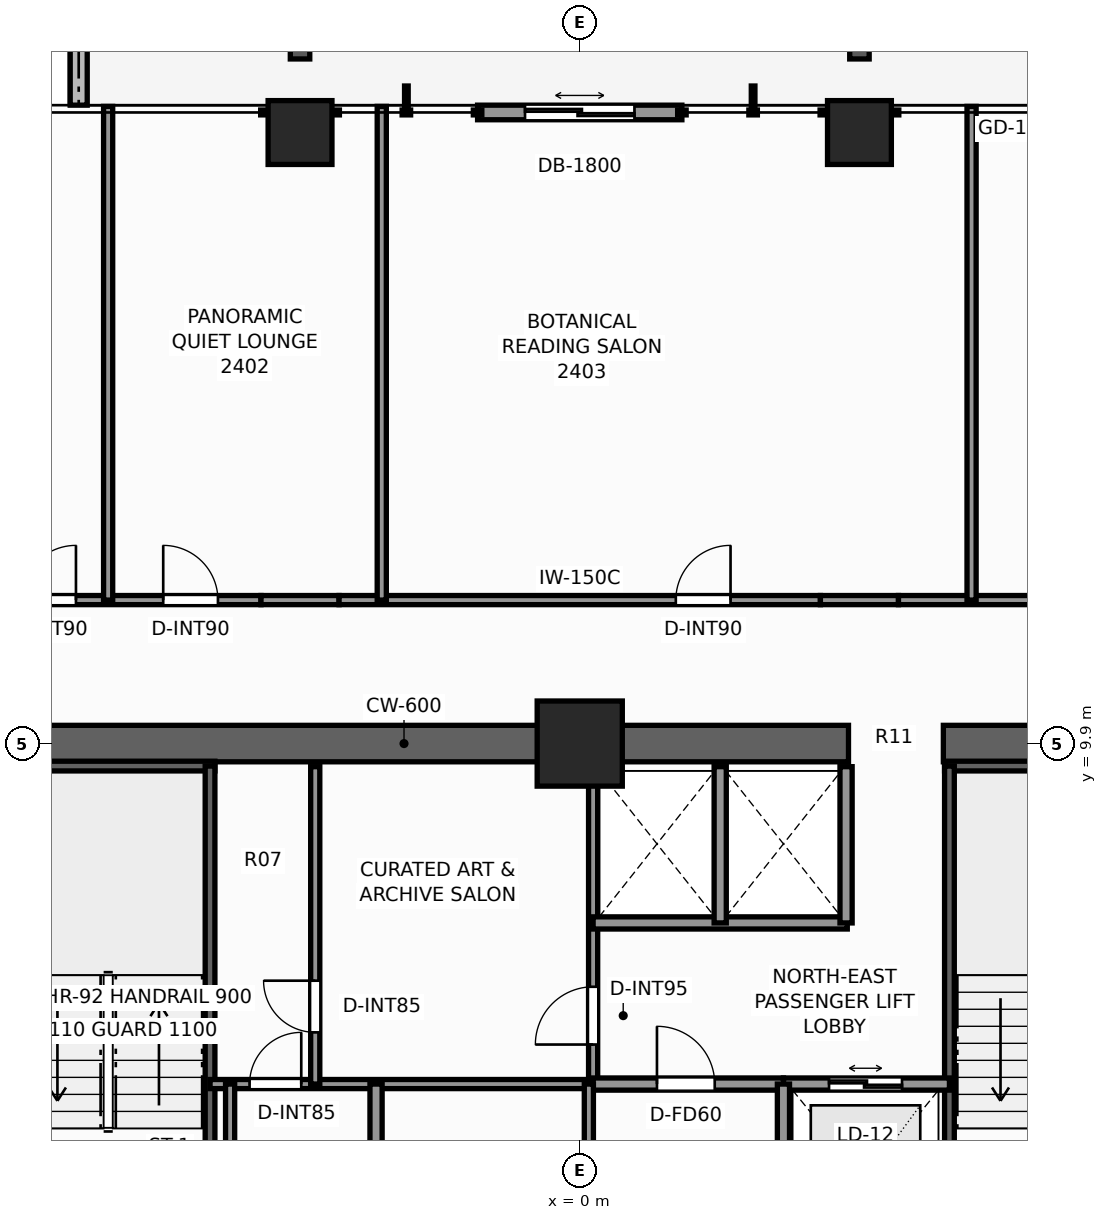
"""IFC4 building model, lengths in metres.
Left out: names, types, materials, properties, quantities, classifications, styles, units other than length and angle.
Written with IfcOpenShell. Run it as: python <this file> out.ifc"""

import sys

from ifc_helpers import new_model, si_unit, direction, frame, frame_2d, origin, origin_2d, place, context, subcontext, project, spatial, rectangle, extrude, element, fill, save


model = new_model("IFC4")
c1 = context("Model", 3, precision=1e-05, world=origin(), true_north=direction((0.0, 1.0)))
c2 = subcontext(c1, "Body", "Model", "MODEL_VIEW")
j1 = project(units=[si_unit("LENGTHUNIT", "METRE"), si_unit("PLANEANGLEUNIT", "RADIAN")], contexts=[c1])
p1 = place(None, origin())
s1 = spatial("IfcSite", under=j1, at=p1, CompositionType="ELEMENT")
p2 = place(p1, origin())
s2 = spatial("IfcBuilding", under=s1, at=p2, CompositionType="ELEMENT")
p3 = place(p2, frame((0.0, 0.0, 85.4)))
s3 = spatial("IfcBuildingStorey", under=s2, at=p3, CompositionType="ELEMENT", Elevation=85.4)
p4 = place(p3, frame((-10.2, 9.9, 0.0), z_axis=(0.0, 0.0, 1.0), x_axis=(1.0, 0.0, 0.0)))
e1 = element("IfcWall", 1, at=p4, inside=s3, PredefinedType="SHEAR", context=c2, shape_type="SweptSolid", body=[
    extrude(rectangle(XDim=14.62, YDim=0.6, at=frame_2d((7.31, 0.0))), origin(), (0.0, 0.0, 1.0), 3.3),
])
p5 = place(p3, frame((5.98, 9.9, 0.0), z_axis=(0.0, 0.0, 1.0), x_axis=(1.0, 0.0, 0.0)))
e2 = element("IfcWall", 2, at=p5, inside=s3, PredefinedType="SHEAR", context=c2, shape_type="SweptSolid", body=[
    extrude(rectangle(XDim=4.22, YDim=0.6, at=frame_2d((2.11, 0.0))), origin(), (0.0, 0.0, 1.0), 3.3),
])
p6 = place(p3, frame((0.0, 9.9, 0.0), z_axis=(0.0, 0.0, 1.0), x_axis=(1.0, 0.0, 0.0)))
e3 = element("IfcColumn", 3, at=p6, inside=s3, PredefinedType="COLUMN", context=c2, shape_type="SweptSolid", body=[
    extrude(rectangle(XDim=1.4, YDim=1.4, at=origin_2d()), origin(), (0.0, 0.0, 1.0), 3.3),
])
for number, where, z_axis, x_axis in (
    (4, (-4.6, 19.95, 0.0), (0.0, 0.0, 1.0), (1.0, 0.0, 0.0)),
    (5, (4.6, 19.95, 0.0), (0.0, 0.0, 1.0), (1.0, 0.0, 0.0)),
):
    element("IfcColumn", number, at=place(p3, frame(where, z_axis=z_axis, x_axis=x_axis)), inside=s3, PredefinedType="COLUMN", context=c2, shape_type="SweptSolid", body=[
        extrude(rectangle(XDim=1.05, YDim=1.05, at=origin_2d()), origin(), (0.0, 0.0, 1.0), 3.3),
    ])
p7 = place(p3, frame((-8.24, 21.713, -0.04), z_axis=(0.0, 0.0, 1.0), x_axis=(0.0, -1.0, 0.0)))
e6 = element("IfcWall", 6, at=p7, inside=s3, PredefinedType="PARAPET", context=c2, shape_type="SweptSolid", body=[
    extrude(rectangle(XDim=1.313, YDim=0.28, at=frame_2d((0.656, 0.0))), origin(), (0.0, 0.0, 1.0), 0.42),
])
p8 = place(p3, frame((-1.68, 20.28, 0.0), z_axis=(0.0, 0.0, 1.0), x_axis=(1.0, 0.0, 0.0)))
e7 = element("IfcWall", 7, at=p8, inside=s3, PredefinedType="STANDARD", context=c2, shape_type="SweptSolid", body=[
    extrude(rectangle(XDim=3.36, YDim=0.24, at=frame_2d((1.68, 0.0))), origin(), (0.0, 0.0, 1.0), 3.08),
])
p9 = place(p8, frame((0.78, 0.0, 0.0)))
e8 = element("IfcOpeningElement", 8, at=p9, cuts=e7, PredefinedType="OPENING", context=c2, shape_type="SweptSolid", body=[
    extrude(rectangle(XDim=1.8, YDim=2.2, at=frame_2d((0.9, 1.1))), frame((0.0, 0.13, 0.0), z_axis=(0.0, -1.0, 0.0), x_axis=(1.0, 0.0, 0.0)), (0.0, 0.0, 1.0), 0.26),
])
p10 = place(p3, frame((-9.52, 9.53, 0.0), z_axis=(0.0, 0.0, 1.0), x_axis=(1.0, 0.0, 0.0)))
e9 = element("IfcWall", 9, at=p10, inside=s3, PredefinedType="SHEAR", context=c2, shape_type="SweptSolid", body=[
    extrude(rectangle(XDim=3.52, YDim=0.16, at=frame_2d((1.76, 0.0))), origin(), (0.0, 0.0, 1.0), 3.3),
])
p11 = place(p3, frame((-6.08, 1.97, 0.0), z_axis=(0.0, 0.0, 1.0), x_axis=(0.0, 1.0, 0.0)))
e10 = element("IfcWall", 10, at=p11, inside=s3, PredefinedType="SHEAR", context=c2, shape_type="SweptSolid", body=[
    extrude(rectangle(XDim=7.56, YDim=0.16, at=frame_2d((3.78, 0.0))), origin(), (0.0, 0.0, 1.0), 3.3),
])
p12 = place(p3, frame((6.0, 9.53, 0.0), z_axis=(0.0, 0.0, 1.0), x_axis=(1.0, 0.0, 0.0)))
e11 = element("IfcWall", 11, at=p12, inside=s3, PredefinedType="SHEAR", context=c2, shape_type="SweptSolid", body=[
    extrude(rectangle(XDim=3.52, YDim=0.16, at=frame_2d((1.76, 0.0))), origin(), (0.0, 0.0, 1.0), 3.3),
])
p13 = place(p3, frame((6.08, 1.97, 0.0), z_axis=(0.0, 0.0, 1.0), x_axis=(0.0, 1.0, 0.0)))
e12 = element("IfcWall", 12, at=p13, inside=s3, PredefinedType="SHEAR", context=c2, shape_type="SweptSolid", body=[
    extrude(rectangle(XDim=7.56, YDim=0.16, at=frame_2d((3.78, 0.0))), origin(), (0.0, 0.0, 1.0), 3.3),
])
p14 = place(p3, frame((3.35, 4.3, 0.0), z_axis=(0.0, 0.0, 1.0), x_axis=(1.0, 0.0, 0.0)))
e13 = element("IfcWall", 13, at=p14, inside=s3, PredefinedType="SOLIDWALL", context=c2, shape_type="SweptSolid", body=[
    extrude(rectangle(XDim=2.73, YDim=0.2, at=frame_2d((1.365, 0.0))), origin(), (0.0, 0.0, 1.0), 3.08),
])
p15 = place(p14, frame((0.75, 0.0, 0.0)))
e14 = element("IfcOpeningElement", 14, at=p15, cuts=e13, PredefinedType="OPENING", context=c2, shape_type="SweptSolid", body=[
    extrude(rectangle(XDim=1.2, YDim=2.25, at=frame_2d((0.6, 1.125))), frame((0.0, 0.11, 0.0), z_axis=(0.0, -1.0, 0.0), x_axis=(1.0, 0.0, 0.0)), (0.0, 0.0, 1.0), 0.22),
])
p16 = place(p3, frame((-6.08, 4.3, 0.0), z_axis=(0.0, 0.0, 1.0), x_axis=(1.0, 0.0, 0.0)))
e15 = element("IfcWall", 15, at=p16, inside=s3, PredefinedType="PARTITIONING", context=c2, shape_type="SweptSolid", body=[
    extrude(rectangle(XDim=6.3, YDim=0.15, at=frame_2d((3.15, 0.0))), origin(), (0.0, 0.0, 1.0), 3.08),
])
p17 = place(p16, frame((0.65, 0.0, 0.0)))
e16 = element("IfcOpeningElement", 16, at=p17, cuts=e15, PredefinedType="OPENING", context=c2, shape_type="SweptSolid", body=[
    extrude(rectangle(XDim=0.85, YDim=2.03, at=frame_2d((0.425, 1.015))), frame((0.0, 0.085, 0.0), z_axis=(0.0, -1.0, 0.0), x_axis=(1.0, 0.0, 0.0)), (0.0, 0.0, 1.0), 0.17),
])
p18 = place(p3, frame((0.22, 4.3, 0.0), z_axis=(0.0, 0.0, 1.0), x_axis=(0.0, 1.0, 0.0)))
e17 = element("IfcWall", 17, at=p18, inside=s3, PredefinedType="PARTITIONING", context=c2, shape_type="SweptSolid", body=[
    extrude(rectangle(XDim=5.22, YDim=0.15, at=frame_2d((2.61, 0.0))), origin(), (0.0, 0.0, 1.0), 3.08),
])
p19 = place(p18, frame((0.65, 0.0, 0.0)))
e18 = element("IfcOpeningElement", 18, at=p19, cuts=e17, PredefinedType="OPENING", context=c2, shape_type="SweptSolid", body=[
    extrude(rectangle(XDim=0.95, YDim=2.06, at=frame_2d((0.475, 1.03))), frame((0.0, 0.085, 0.0), z_axis=(0.0, -1.0, 0.0), x_axis=(1.0, 0.0, 0.0)), (0.0, 0.0, 1.0), 0.17),
])
p20 = place(p3, frame((-4.35, 4.3, 0.0), z_axis=(0.0, 0.0, 1.0), x_axis=(0.0, 1.0, 0.0)))
e19 = element("IfcWall", 19, at=p20, inside=s3, PredefinedType="PARTITIONING", context=c2, shape_type="SweptSolid", body=[
    extrude(rectangle(XDim=5.22, YDim=0.15, at=frame_2d((2.61, 0.0))), origin(), (0.0, 0.0, 1.0), 3.08),
])
p21 = place(p20, frame((0.85, 0.0, 0.0)))
e20 = element("IfcOpeningElement", 20, at=p21, cuts=e19, PredefinedType="OPENING", context=c2, shape_type="SweptSolid", body=[
    extrude(rectangle(XDim=0.85, YDim=2.03, at=frame_2d((0.425, 1.015))), frame((0.0, 0.085, 0.0), z_axis=(0.0, -1.0, 0.0), x_axis=(1.0, 0.0, 0.0)), (0.0, 0.0, 1.0), 0.17),
])
p22 = place(p3, frame((0.22, 6.95, 0.0), z_axis=(0.0, 0.0, 1.0), x_axis=(1.0, 0.0, 0.0)))
e21 = element("IfcWall", 21, at=p22, inside=s3, PredefinedType="SOLIDWALL", context=c2, shape_type="SweptSolid", body=[
    extrude(rectangle(XDim=4.18, YDim=0.2, at=frame_2d((2.09, 0.0))), origin(), (0.0, 0.0, 1.0), 3.08),
])
for number, where, z_axis, x_axis in (
    (22, (4.38, 6.95, 0.0), (0.0, 0.0, 1.0), (0.0, 1.0, 0.0)),
    (23, (2.31, 6.95, 0.0), (0.0, 0.0, 1.0), (0.0, 1.0, 0.0)),
):
    element("IfcWall", number, at=place(p3, frame(where, z_axis=z_axis, x_axis=x_axis)), inside=s3, PredefinedType="SOLIDWALL", context=c2, shape_type="SweptSolid", body=[
        extrude(rectangle(XDim=2.57, YDim=0.2, at=frame_2d((1.285, 0.0))), origin(), (0.0, 0.0, 1.0), 3.08),
    ])
p23 = place(p3, frame((0.22, 4.3, 0.0), z_axis=(0.0, 0.0, 1.0), x_axis=(1.0, 0.0, 0.0)))
e24 = element("IfcWall", 24, at=p23, inside=s3, PredefinedType="SOLIDWALL", context=c2, shape_type="SweptSolid", body=[
    extrude(rectangle(XDim=3.13, YDim=0.2, at=frame_2d((1.565, 0.0))), origin(), (0.0, 0.0, 1.0), 3.08),
])
p24 = place(p23, frame((1.05, 0.0, 0.0)))
e25 = element("IfcOpeningElement", 25, at=p24, cuts=e24, PredefinedType="OPENING", context=c2, shape_type="SweptSolid", body=[
    extrude(rectangle(XDim=0.95, YDim=2.06, at=frame_2d((0.475, 1.03))), frame((0.0, 0.11, 0.0), z_axis=(0.0, -1.0, 0.0), x_axis=(1.0, 0.0, 0.0)), (0.0, 0.0, 1.0), 0.22),
])
for number, where, z_axis, x_axis in (
    (26, (-3.35, 1.1, 0.0), (0.0, 0.0, 1.0), (0.0, 1.0, 0.0)),
    (27, (3.35, 1.1, 0.0), (0.0, 0.0, 1.0), (0.0, 1.0, 0.0)),
):
    element("IfcWall", number, at=place(p3, frame(where, z_axis=z_axis, x_axis=x_axis)), inside=s3, PredefinedType="SOLIDWALL", context=c2, shape_type="SweptSolid", body=[
        extrude(rectangle(XDim=3.2, YDim=0.2, at=frame_2d((1.6, 0.0))), origin(), (0.0, 0.0, 1.0), 3.08),
    ])
p25 = place(p3, frame((0.15, -1.7, 0.0), z_axis=(0.0, 0.0, 1.0), x_axis=(0.0, 1.0, 0.0)))
e28 = element("IfcWall", 28, at=p25, inside=s3, PredefinedType="PARTITIONING", context=c2, shape_type="SweptSolid", body=[
    extrude(rectangle(XDim=6.0, YDim=0.15, at=frame_2d((3.0, 0.0))), origin(), (0.0, 0.0, 1.0), 3.08),
])
p26 = place(p25, frame((3.6, 0.0, 0.0)))
e29 = element("IfcOpeningElement", 29, at=p26, cuts=e28, PredefinedType="OPENING", context=c2, shape_type="SweptSolid", body=[
    extrude(rectangle(XDim=0.85, YDim=2.03, at=frame_2d((0.425, 1.015))), frame((0.0, 0.085, 0.0), z_axis=(0.0, -1.0, 0.0), x_axis=(1.0, 0.0, 0.0)), (0.0, 0.0, 1.0), 0.17),
])
p27 = place(p3, frame((-5.75, 1.97, 0.0), z_axis=(0.0, 0.0, 1.0), x_axis=(0.0, 1.0, 0.0)))
e30 = element("IfcWall", 30, at=p27, inside=s3, PredefinedType="PARTITIONING", context=c2, shape_type="SweptSolid", body=[
    extrude(rectangle(XDim=2.33, YDim=0.15, at=frame_2d((1.165, 0.0))), origin(), (0.0, 0.0, 1.0), 3.08),
])
p28 = place(p3, frame((-10.013, 12.26, 0.0), z_axis=(0.0, 0.0, 1.0), x_axis=(1.0, 0.0, 0.0)))
e31 = element("IfcWall", 31, at=p28, inside=s3, PredefinedType="PARTITIONING", context=c2, shape_type="SweptSolid", body=[
    extrude(rectangle(XDim=4.771, YDim=0.15, at=frame_2d((2.386, 0.0))), origin(), (0.0, 0.0, 1.0), 3.08),
])
p29 = place(p28, frame((0.828, 0.0, 0.0)))
e32 = element("IfcOpeningElement", 32, at=p29, cuts=e31, PredefinedType="OPENING", context=c2, shape_type="SweptSolid", body=[
    extrude(rectangle(XDim=0.9, YDim=2.06, at=frame_2d((0.45, 1.03))), frame((0.0, 0.085, 0.0), z_axis=(0.0, -1.0, 0.0), x_axis=(1.0, 0.0, 0.0)), (0.0, 0.0, 1.0), 0.17),
])
p30 = place(p28, frame((3.163, 0.0, 0.0)))
e33 = element("IfcOpeningElement", 33, at=p30, cuts=e31, PredefinedType="OPENING", context=c2, shape_type="SweptSolid", body=[
    extrude(rectangle(XDim=0.9, YDim=2.06, at=frame_2d((0.45, 1.03))), frame((0.0, 0.085, 0.0), z_axis=(0.0, -1.0, 0.0), x_axis=(1.0, 0.0, 0.0)), (0.0, 0.0, 1.0), 0.17),
])
p31 = place(p3, frame((-5.242, 12.26, 0.0), z_axis=(0.0, 0.0, 1.0), x_axis=(1.0, 0.0, 0.0)))
e34 = element("IfcWall", 34, at=p31, inside=s3, PredefinedType="PARTITIONING", context=c2, shape_type="SweptSolid", body=[
    extrude(rectangle(XDim=1.284, YDim=0.15, at=frame_2d((0.642, 0.0))), origin(), (0.0, 0.0, 1.0), 1.265),
])
p32 = place(p3, frame((-3.958, 12.26, 0.0), z_axis=(0.0, 0.0, 1.0), x_axis=(1.0, 0.0, 0.0)))
e35 = element("IfcWall", 35, at=p32, inside=s3, PredefinedType="PARTITIONING", context=c2, shape_type="SweptSolid", body=[
    extrude(rectangle(XDim=7.916, YDim=0.15, at=frame_2d((3.958, 0.0))), origin(), (0.0, 0.0, 1.0), 2.605),
])
p33 = place(p32, frame((5.538, 0.0, 0.0)))
e36 = element("IfcOpeningElement", 36, at=p33, cuts=e35, PredefinedType="OPENING", context=c2, shape_type="SweptSolid", body=[
    extrude(rectangle(XDim=0.9, YDim=2.06, at=frame_2d((0.45, 1.03))), frame((0.0, 0.085, 0.0), z_axis=(0.0, -1.0, 0.0), x_axis=(1.0, 0.0, 0.0)), (0.0, 0.0, 1.0), 0.17),
])
p34 = place(p3, frame((3.958, 12.26, 0.0), z_axis=(0.0, 0.0, 1.0), x_axis=(1.0, 0.0, 0.0)))
e37 = element("IfcWall", 37, at=p34, inside=s3, PredefinedType="PARTITIONING", context=c2, shape_type="SweptSolid", body=[
    extrude(rectangle(XDim=1.284, YDim=0.15, at=frame_2d((0.642, 0.0))), origin(), (0.0, 0.0, 1.0), 1.265),
])
p35 = place(p3, frame((5.242, 12.26, 0.0), z_axis=(0.0, 0.0, 1.0), x_axis=(1.0, 0.0, 0.0)))
e38 = element("IfcWall", 38, at=p35, inside=s3, PredefinedType="PARTITIONING", context=c2, shape_type="SweptSolid", body=[
    extrude(rectangle(XDim=4.771, YDim=0.15, at=frame_2d((2.386, 0.0))), origin(), (0.0, 0.0, 1.0), 3.08),
])
p36 = place(p35, frame((2.519, 0.0, 0.0)))
e39 = element("IfcOpeningElement", 39, at=p36, cuts=e38, PredefinedType="OPENING", context=c2, shape_type="SweptSolid", body=[
    extrude(rectangle(XDim=0.9, YDim=2.06, at=frame_2d((0.45, 1.03))), frame((0.0, 0.085, 0.0), z_axis=(0.0, -1.0, 0.0), x_axis=(1.0, 0.0, 0.0)), (0.0, 0.0, 1.0), 0.17),
])
for number, where, z_axis, x_axis in (
    (40, (-7.756, 12.26, 0.0), (0.0, 0.0, 1.0), (0.0, 1.0, 0.0)),
    (41, (-3.256, 12.26, 0.0), (0.0, 0.0, 1.0), (0.0, 1.0, 0.0)),
    (42, (6.444, 12.26, 0.0), (0.0, 0.0, 1.0), (0.0, 1.0, 0.0)),
):
    element("IfcWall", number, at=place(p3, frame(where, z_axis=z_axis, x_axis=x_axis)), inside=s3, PredefinedType="PARTITIONING", context=c2, shape_type="SweptSolid", body=[
        extrude(rectangle(XDim=8.12, YDim=0.15, at=frame_2d((4.06, 0.0))), origin(), (0.0, 0.0, 1.0), 2.449),
    ])
p37 = place(p9, origin())
e43 = element("IfcDoor", 43, at=p37, inside=s3, OperationType="DOUBLE_DOOR_SLIDING", PredefinedType="DOOR", context=c2, shape_type="SweptSolid", body=[
    extrude(rectangle(XDim=1.8, YDim=2.2, at=frame_2d((0.9, 1.1))), frame((0.0, 0.025, 0.0), z_axis=(0.0, -1.0, 0.0), x_axis=(1.0, 0.0, 0.0)), (0.0, 0.0, 1.0), 0.05),
])
fill(e8, e43)
p38 = place(p15, origin())
e44 = element("IfcDoor", 44, at=p38, inside=s3, OperationType="DOUBLE_DOOR_SLIDING", PredefinedType="DOOR", context=c2, shape_type="SweptSolid", body=[
    extrude(rectangle(XDim=1.2, YDim=2.25, at=frame_2d((0.6, 1.125))), frame((0.0, 0.025, 0.0), z_axis=(0.0, -1.0, 0.0), x_axis=(1.0, 0.0, 0.0)), (0.0, 0.0, 1.0), 0.05),
])
fill(e14, e44)
p39 = place(p19, origin())
e45 = element("IfcDoor", 45, at=p39, inside=s3, OperationType="SINGLE_SWING_LEFT", PredefinedType="DOOR", context=c2, shape_type="SweptSolid", body=[
    extrude(rectangle(XDim=0.95, YDim=2.06, at=frame_2d((0.475, 1.03))), frame((0.0, 0.025, 0.0), z_axis=(0.0, -1.0, 0.0), x_axis=(1.0, 0.0, 0.0)), (0.0, 0.0, 1.0), 0.05),
])
fill(e18, e45)
p40 = place(p21, origin())
e46 = element("IfcDoor", 46, at=p40, inside=s3, OperationType="SINGLE_SWING_RIGHT", PredefinedType="DOOR", context=c2, shape_type="SweptSolid", body=[
    extrude(rectangle(XDim=0.85, YDim=2.03, at=frame_2d((0.425, 1.015))), frame((0.0, 0.025, 0.0), z_axis=(0.0, -1.0, 0.0), x_axis=(1.0, 0.0, 0.0)), (0.0, 0.0, 1.0), 0.05),
])
fill(e20, e46)
p41 = place(p24, origin())
e47 = element("IfcDoor", 47, at=p41, inside=s3, OperationType="SINGLE_SWING_LEFT", PredefinedType="DOOR", context=c2, shape_type="SweptSolid", body=[
    extrude(rectangle(XDim=0.95, YDim=2.06, at=frame_2d((0.475, 1.03))), frame((0.0, 0.025, 0.0), z_axis=(0.0, -1.0, 0.0), x_axis=(1.0, 0.0, 0.0)), (0.0, 0.0, 1.0), 0.05),
])
fill(e25, e47)
p42 = place(p17, origin())
e48 = element("IfcDoor", 48, at=p42, inside=s3, OperationType="SINGLE_SWING_RIGHT", PredefinedType="DOOR", context=c2, shape_type="SweptSolid", body=[
    extrude(rectangle(XDim=0.85, YDim=2.03, at=frame_2d((0.425, 1.015))), frame((0.0, 0.025, 0.0), z_axis=(0.0, -1.0, 0.0), x_axis=(1.0, 0.0, 0.0)), (0.0, 0.0, 1.0), 0.05),
])
fill(e16, e48)
p43 = place(p29, origin())
e49 = element("IfcDoor", 49, at=p43, inside=s3, OperationType="SINGLE_SWING_RIGHT", PredefinedType="DOOR", context=c2, shape_type="SweptSolid", body=[
    extrude(rectangle(XDim=0.9, YDim=2.06, at=frame_2d((0.45, 1.03))), frame((0.0, 0.025, 0.0), z_axis=(0.0, -1.0, 0.0), x_axis=(1.0, 0.0, 0.0)), (0.0, 0.0, 1.0), 0.05),
])
fill(e32, e49)
p44 = place(p30, origin())
e50 = element("IfcDoor", 50, at=p44, inside=s3, OperationType="SINGLE_SWING_LEFT", PredefinedType="DOOR", context=c2, shape_type="SweptSolid", body=[
    extrude(rectangle(XDim=0.9, YDim=2.06, at=frame_2d((0.45, 1.03))), frame((0.0, 0.025, 0.0), z_axis=(0.0, -1.0, 0.0), x_axis=(1.0, 0.0, 0.0)), (0.0, 0.0, 1.0), 0.05),
])
fill(e33, e50)
p45 = place(p33, origin())
e51 = element("IfcDoor", 51, at=p45, inside=s3, OperationType="SINGLE_SWING_RIGHT", PredefinedType="DOOR", context=c2, shape_type="SweptSolid", body=[
    extrude(rectangle(XDim=0.9, YDim=2.06, at=frame_2d((0.45, 1.03))), frame((0.0, 0.025, 0.0), z_axis=(0.0, -1.0, 0.0), x_axis=(1.0, 0.0, 0.0)), (0.0, 0.0, 1.0), 0.05),
])
fill(e36, e51)
save(model, sys.argv[1])
